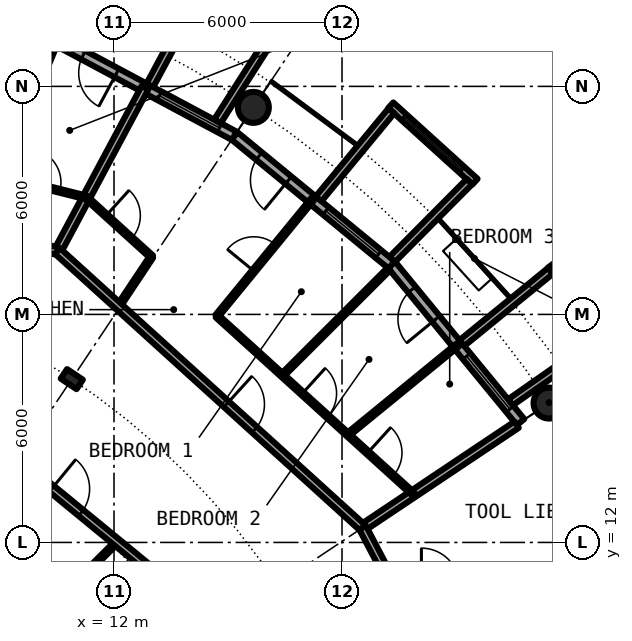
"""IFC4 building model, lengths in metres.
Left out: names, types, materials, properties, quantities, classifications, styles, units other than length and angle.
Written with IfcOpenShell. Run it as: python <this file> out.ifc"""

import sys

from ifc_helpers import new_model, si_unit, direction, frame, frame_2d, origin, origin_2d, place, context, subcontext, project, spatial, rectangle, circle, hollow_circle, i_section, extrude, element, fill, save


model = new_model("IFC4")
c1 = context("Model", 3, precision=1e-05, world=origin(), true_north=direction((0.0, 1.0)))
c2 = subcontext(c1, "Body", "Model", "MODEL_VIEW")
j1 = project(units=[si_unit("LENGTHUNIT", "METRE"), si_unit("PLANEANGLEUNIT", "RADIAN")], contexts=[c1])
p1 = place(None, origin())
s1 = spatial("IfcSite", under=j1, at=p1, CompositionType="ELEMENT")
p2 = place(p1, origin())
s2 = spatial("IfcBuilding", under=s1, at=p2, CompositionType="ELEMENT")
p3 = place(p2, frame((0.0, 0.0, 161.6)))
s3 = spatial("IfcBuildingStorey", under=s2, at=p3, CompositionType="ELEMENT", Elevation=161.6)
for number, where, z_axis, x_axis in (
    (1, (23.448, 15.667, 0.0), (0.0, 0.0, 1.0), (1.0, 0.0, 0.0)),
    (2, (15.667, 23.448, 0.0), (0.0, 0.0, 1.0), (1.0, 0.0, 0.0)),
):
    element("IfcColumn", number, at=place(p3, frame(where, z_axis=z_axis, x_axis=x_axis)), inside=s3, PredefinedType="COLUMN", context=c2, shape_type="SweptSolid", body=[
        extrude(hollow_circle(Radius=0.406, WallThickness=0.04, at=origin_2d()), origin(), (0.0, 0.0, 1.0), 3.05),
    ])
p4 = place(p3, frame((10.889, 16.297, 0.0), z_axis=(0.0, 0.0, 1.0), x_axis=(0.55557023302, 0.831469612303, 0.0)))
e3 = element("IfcColumn", 3, at=p4, inside=s3, PredefinedType="COLUMN", context=c2, shape_type="SweptSolid", body=[
    extrude(i_section(OverallWidth=0.3, OverallDepth=0.5, WebThickness=0.014, FlangeThickness=0.028, FilletRadius=0.027, at=origin_2d()), origin(), (0.0, 0.0, 1.0), 3.05),
])
p5 = place(p3, frame((22.699, 15.167, 0.0), z_axis=(0.0, 0.0, 1.0), x_axis=(-0.634382322723, 0.773019449054, 0.0)))
e4 = element("IfcWall", 4, at=p5, inside=s3, PredefinedType="SOLIDWALL", context=c2, shape_type="SweptSolid", body=[
    extrude(rectangle(XDim=5.352, YDim=0.25, at=frame_2d((2.676, 0.0))), origin(), (0.0, 0.0, 1.0), 2.7),
])
p6 = place(p5, frame((0.441, 0.0, 0.3)))
e5 = element("IfcOpeningElement", 5, at=p6, cuts=e4, PredefinedType="OPENING", context=c2, shape_type="SweptSolid", body=[
    extrude(rectangle(XDim=1.8, YDim=2.1, at=frame_2d((0.9, 1.05))), frame((0.0, 0.135, 0.0), z_axis=(0.0, -1.0, 0.0), x_axis=(1.0, 0.0, 0.0)), (0.0, 0.0, 1.0), 0.27),
])
p7 = place(p5, frame((3.51, 0.0, 0.0)))
e6 = element("IfcOpeningElement", 6, at=p7, cuts=e4, PredefinedType="OPENING", context=c2, shape_type="SweptSolid", body=[
    extrude(rectangle(XDim=1.0, YDim=2.2, at=frame_2d((0.5, 1.1))), frame((0.0, 0.135, 0.0), z_axis=(0.0, -1.0, 0.0), x_axis=(1.0, 0.0, 0.0)), (0.0, 0.0, 1.0), 0.27),
])
p8 = place(p3, frame((24.972, 17.337, -0.03), z_axis=(0.0, 0.0, 1.0), x_axis=(-0.602806268067, 0.797887588059, 0.0)))
e7 = element("IfcWall", 7, at=p8, inside=s3, PredefinedType="SOLIDWALL", context=c2, shape_type="SweptSolid", body=[
    extrude(rectangle(XDim=2.447, YDim=0.2, at=frame_2d((1.223, 0.0))), origin(), (0.0, 0.0, 1.0), 2.73),
])
p9 = place(p8, frame((0.183, 0.0, 0.33)))
e8 = element("IfcOpeningElement", 8, at=p9, cuts=e7, PredefinedType="OPENING", context=c2, shape_type="SweptSolid", body=[
    extrude(circle(Radius=1.04, at=frame_2d((1.04, 1.04))), frame((0.0, 0.11, 0.0), z_axis=(0.0, -1.0, 0.0), x_axis=(1.0, 0.0, 0.0)), (0.0, 0.0, 1.0), 0.22),
])
p10 = place(p3, frame((22.433, 15.688, -0.03), z_axis=(0.0, 0.0, 1.0), x_axis=(0.819373043115, 0.573260687834, 0.0)))
e9 = element("IfcWall", 9, at=p10, inside=s3, PredefinedType="SOLIDWALL", context=c2, shape_type="SweptSolid", body=[
    extrude(rectangle(XDim=2.925, YDim=0.2, at=frame_2d((1.463, 0.0))), origin(), (0.0, 0.0, 1.0), 2.73),
])
p11 = place(p3, frame((21.155, 17.246, -0.03), z_axis=(0.0, 0.0, 1.0), x_axis=(0.775179004516, 0.631741648902, 0.0)))
e10 = element("IfcWall", 10, at=p11, inside=s3, PredefinedType="SOLIDWALL", context=c2, shape_type="SweptSolid", body=[
    extrude(rectangle(XDim=3.006, YDim=0.2, at=frame_2d((1.503, 0.0))), origin(), (0.0, 0.0, 1.0), 2.73),
])
p12 = place(p3, frame((19.304, 19.304, 0.0), z_axis=(0.0, 0.0, 1.0), x_axis=(-0.773019449054, 0.634382322723, 0.0)))
e11 = element("IfcWall", 11, at=p12, inside=s3, PredefinedType="SOLIDWALL", context=c2, shape_type="SweptSolid", body=[
    extrude(rectangle(XDim=5.352, YDim=0.25, at=frame_2d((2.676, 0.0))), origin(), (0.0, 0.0, 1.0), 2.7),
])
p13 = place(p12, frame((0.441, 0.0, 0.3)))
e12 = element("IfcOpeningElement", 12, at=p13, cuts=e11, PredefinedType="OPENING", context=c2, shape_type="SweptSolid", body=[
    extrude(rectangle(XDim=1.8, YDim=2.1, at=frame_2d((0.9, 1.05))), frame((0.0, 0.135, 0.0), z_axis=(0.0, -1.0, 0.0), x_axis=(1.0, 0.0, 0.0)), (0.0, 0.0, 1.0), 0.27),
])
p14 = place(p12, frame((3.51, 0.0, 0.0)))
e13 = element("IfcOpeningElement", 13, at=p14, cuts=e11, PredefinedType="OPENING", context=c2, shape_type="SweptSolid", body=[
    extrude(rectangle(XDim=1.0, YDim=2.2, at=frame_2d((0.5, 1.1))), frame((0.0, 0.135, 0.0), z_axis=(0.0, -1.0, 0.0), x_axis=(1.0, 0.0, 0.0)), (0.0, 0.0, 1.0), 0.27),
])
p15 = place(p3, frame((21.5, 21.493, -0.03), z_axis=(0.0, 0.0, 1.0), x_axis=(-0.740998365753, 0.671506829416, 0.0)))
e14 = element("IfcWall", 14, at=p15, inside=s3, PredefinedType="SOLIDWALL", context=c2, shape_type="SweptSolid", body=[
    extrude(rectangle(XDim=2.993, YDim=0.2, at=frame_2d((1.497, 0.0))), origin(), (0.0, 0.0, 1.0), 2.73),
])
p16 = place(p15, frame((0.457, 0.0, 0.33)))
e15 = element("IfcOpeningElement", 15, at=p16, cuts=e14, PredefinedType="OPENING", context=c2, shape_type="SweptSolid", body=[
    extrude(circle(Radius=1.04, at=frame_2d((1.04, 1.04))), frame((0.0, 0.11, 0.0), z_axis=(0.0, -1.0, 0.0), x_axis=(1.0, 0.0, 0.0)), (0.0, 0.0, 1.0), 0.22),
])
p17 = place(p3, frame((19.323, 19.45, -0.03), z_axis=(0.0, 0.0, 1.0), x_axis=(0.704476739375, 0.709727076896, 0.0)))
e16 = element("IfcWall", 16, at=p17, inside=s3, PredefinedType="SOLIDWALL", context=c2, shape_type="SweptSolid", body=[
    extrude(rectangle(XDim=2.883, YDim=0.2, at=frame_2d((1.441, 0.0))), origin(), (0.0, 0.0, 1.0), 2.73),
])
p18 = place(p3, frame((17.384, 21.041, -0.03), z_axis=(0.0, 0.0, 1.0), x_axis=(0.63709551667, 0.770784861449, 0.0)))
e17 = element("IfcWall", 17, at=p18, inside=s3, PredefinedType="SOLIDWALL", context=c2, shape_type="SweptSolid", body=[
    extrude(rectangle(XDim=3.006, YDim=0.2, at=frame_2d((1.503, 0.0))), origin(), (0.0, 0.0, 1.0), 2.73),
])
p19 = place(p3, frame((15.167, 22.699, 0.0), z_axis=(0.0, 0.0, 1.0), x_axis=(-0.881915646801, 0.471407246368, 0.0)))
e18 = element("IfcWall", 18, at=p19, inside=s3, PredefinedType="SOLIDWALL", context=c2, shape_type="SweptSolid", body=[
    extrude(rectangle(XDim=5.352, YDim=0.25, at=frame_2d((2.676, 0.0))), origin(), (0.0, 0.0, 1.0), 2.7),
])
p20 = place(p19, frame((0.441, 0.0, 0.3)))
e19 = element("IfcOpeningElement", 19, at=p20, cuts=e18, PredefinedType="OPENING", context=c2, shape_type="SweptSolid", body=[
    extrude(rectangle(XDim=1.8, YDim=2.1, at=frame_2d((0.9, 1.05))), frame((0.0, 0.135, 0.0), z_axis=(0.0, -1.0, 0.0), x_axis=(1.0, 0.0, 0.0)), (0.0, 0.0, 1.0), 0.27),
])
p21 = place(p19, frame((3.51, 0.0, 0.0)))
e20 = element("IfcOpeningElement", 20, at=p21, cuts=e18, PredefinedType="OPENING", context=c2, shape_type="SweptSolid", body=[
    extrude(rectangle(XDim=1.0, YDim=2.2, at=frame_2d((0.5, 1.1))), frame((0.0, 0.135, 0.0), z_axis=(0.0, -1.0, 0.0), x_axis=(1.0, 0.0, 0.0)), (0.0, 0.0, 1.0), 0.27),
])
p22 = place(p3, frame((14.722, 23.079, -0.03), z_axis=(0.0, 0.0, 1.0), x_axis=(0.537572179146, 0.843217737129, 0.0)))
e21 = element("IfcWall", 21, at=p22, inside=s3, PredefinedType="SOLIDWALL", context=c2, shape_type="SweptSolid", body=[
    extrude(rectangle(XDim=2.924, YDim=0.2, at=frame_2d((1.462, 0.0))), origin(), (0.0, 0.0, 1.0), 2.73),
])
p23 = place(p3, frame((12.945, 24.029, -0.03), z_axis=(0.0, 0.0, 1.0), x_axis=(0.474424310775, 0.88029629861, 0.0)))
e22 = element("IfcWall", 22, at=p23, inside=s3, PredefinedType="SOLIDWALL", context=c2, shape_type="SweptSolid", body=[
    extrude(rectangle(XDim=3.006, YDim=0.2, at=frame_2d((1.503, 0.0))), origin(), (0.0, 0.0, 1.0), 2.73),
])
p24 = place(p3, frame((9.013, 21.642, 0.0), z_axis=(0.0, 0.0, 1.0), x_axis=(0.384420204655, 0.923158223845, 0.0)))
e23 = element("IfcWall", 23, at=p24, inside=s3, PredefinedType="PARTITIONING", context=c2, shape_type="SweptSolid", body=[
    extrude(rectangle(XDim=3.73, YDim=0.1, at=frame_2d((1.865, 0.0))), origin(), (0.0, 0.0, 1.0), 2.7),
])
p25 = place(p3, frame((9.148, 9.1, 0.0), z_axis=(0.0, 0.0, 1.0), x_axis=(0.708822693149, 0.705386695138, 0.0)))
e24 = element("IfcWall", 24, at=p25, inside=s3, PredefinedType="PARTITIONING", context=c2, shape_type="SweptSolid", body=[
    extrude(rectangle(XDim=4.121, YDim=0.1, at=frame_2d((2.061, 0.0))), origin(), (0.0, 0.0, 1.0), 2.7),
])
p26 = place(p25, frame((1.611, 0.0, 0.0)))
e25 = element("IfcOpeningElement", 25, at=p26, cuts=e24, PredefinedType="OPENING", context=c2, shape_type="SweptSolid", body=[
    extrude(rectangle(XDim=0.9, YDim=2.3, at=frame_2d((0.45, 1.15))), frame((0.0, 0.06, 0.0), z_axis=(0.0, -1.0, 0.0), x_axis=(1.0, 0.0, 0.0)), (0.0, 0.0, 1.0), 0.12),
])
p27 = place(p3, frame((10.516, 19.665, 0.0), z_axis=(0.0, 0.0, 1.0), x_axis=(0.471388689095, 0.881925565903, 0.0)))
e26 = element("IfcWall", 26, at=p27, inside=s3, PredefinedType="PARTITIONING", context=c2, shape_type="SweptSolid", body=[
    extrude(rectangle(XDim=4.875, YDim=0.2, at=frame_2d((2.438, 0.0))), origin(), (0.0, 0.0, 1.0), 2.7),
])
p28 = place(p3, frame((12.118, 18.211, 0.0), z_axis=(0.0, 0.0, 1.0), x_axis=(0.554125989098, 0.832432813028, 0.0)))
e27 = element("IfcWall", 27, at=p28, inside=s3, PredefinedType="PARTITIONING", context=c2, shape_type="SweptSolid", body=[
    extrude(rectangle(XDim=1.57, YDim=0.1, at=frame_2d((0.785, 0.0))), origin(), (0.0, 0.0, 1.0), 2.7),
])
p29 = place(p3, frame((14.709, 17.958, 0.0), z_axis=(0.0, 0.0, 1.0), x_axis=(0.633590098448, 0.773668913133, 0.0)))
e28 = element("IfcWall", 28, at=p29, inside=s3, PredefinedType="PARTITIONING", context=c2, shape_type="SweptSolid", body=[
    extrude(rectangle(XDim=3.962, YDim=0.1, at=frame_2d((1.981, 0.0))), origin(), (0.0, 0.0, 1.0), 2.7),
])
p30 = place(p29, frame((1.531, 0.0, 0.0)))
e29 = element("IfcOpeningElement", 29, at=p30, cuts=e28, PredefinedType="OPENING", context=c2, shape_type="SweptSolid", body=[
    extrude(rectangle(XDim=0.9, YDim=2.3, at=frame_2d((0.45, 1.15))), frame((0.0, 0.06, 0.0), z_axis=(0.0, -1.0, 0.0), x_axis=(1.0, 0.0, 0.0)), (0.0, 0.0, 1.0), 0.12),
])
p31 = place(p3, frame((16.43, 16.398, 0.0), z_axis=(0.0, 0.0, 1.0), x_axis=(0.707722727509, 0.706490297858, 0.0)))
e30 = element("IfcWall", 30, at=p31, inside=s3, PredefinedType="PARTITIONING", context=c2, shape_type="SweptSolid", body=[
    extrude(rectangle(XDim=3.962, YDim=0.1, at=frame_2d((1.981, 0.0))), origin(), (0.0, 0.0, 1.0), 2.7),
])
p32 = place(p3, frame((18.154, 14.834, 0.0), z_axis=(0.0, 0.0, 1.0), x_axis=(0.77429537896, 0.632824356454, 0.0)))
e31 = element("IfcWall", 31, at=p32, inside=s3, PredefinedType="PARTITIONING", context=c2, shape_type="SweptSolid", body=[
    extrude(rectangle(XDim=3.731, YDim=0.1, at=frame_2d((1.865, 0.0))), origin(), (0.0, 0.0, 1.0), 2.7),
])
p33 = place(p3, frame((18.542, 12.389, 0.0), z_axis=(0.0, 0.0, 1.0), x_axis=(0.831387096605, 0.55569370664, 0.0)))
e32 = element("IfcWall", 32, at=p33, inside=s3, PredefinedType="PARTITIONING", context=c2, shape_type="SweptSolid", body=[
    extrude(rectangle(XDim=4.875, YDim=0.2, at=frame_2d((2.438, 0.0))), origin(), (0.0, 0.0, 1.0), 2.7),
])
p34 = place(p3, frame((6.773, 16.353, 0.0), z_axis=(0.0, 0.0, 1.0), x_axis=(0.773034536097, -0.634363938131, 0.0)))
e33 = element("IfcWall", 33, at=p34, inside=s3, PredefinedType="PARTITIONING", context=c2, shape_type="SweptSolid", body=[
    extrude(rectangle(XDim=10.277, YDim=0.2, at=frame_2d((5.138, 0.0))), origin(), (0.0, 0.0, 1.0), 2.7),
])
p35 = place(p34, frame((4.638, 0.0, 0.0)))
e34 = element("IfcOpeningElement", 34, at=p35, cuts=e33, PredefinedType="OPENING", context=c2, shape_type="SweptSolid", body=[
    extrude(rectangle(XDim=1.0, YDim=2.3, at=frame_2d((0.5, 1.15))), frame((0.0, 0.11, 0.0), z_axis=(0.0, -1.0, 0.0), x_axis=(1.0, 0.0, 0.0)), (0.0, 0.0, 1.0), 0.22),
])
p36 = place(p3, frame((0.0, 22.3, 0.0), z_axis=(0.0, 0.0, 1.0), x_axis=(0.969975381822, -0.243203122222, 0.0)))
e35 = element("IfcWall", 35, at=p36, inside=s3, PredefinedType="PARTITIONING", context=c2, shape_type="SweptSolid", body=[
    extrude(rectangle(XDim=10.843, YDim=0.2, at=frame_2d((5.421, 0.0))), origin(), (0.0, 0.0, 1.0), 2.7),
])
p37 = place(p36, frame((6.002, 0.0, 0.0)))
e36 = element("IfcOpeningElement", 36, at=p37, cuts=e35, PredefinedType="OPENING", context=c2, shape_type="SweptSolid", body=[
    extrude(rectangle(XDim=1.0, YDim=2.3, at=frame_2d((0.5, 1.15))), frame((0.0, 0.11, 0.0), z_axis=(0.0, -1.0, 0.0), x_axis=(1.0, 0.0, 0.0)), (0.0, 0.0, 1.0), 0.22),
])
p38 = place(p3, frame((10.512, 19.667, 0.0), z_axis=(0.0, 0.0, 1.0), x_axis=(0.740849323054, -0.67167125927, 0.0)))
e37 = element("IfcWall", 37, at=p38, inside=s3, PredefinedType="PARTITIONING", context=c2, shape_type="SweptSolid", body=[
    extrude(rectangle(XDim=10.842, YDim=0.2, at=frame_2d((5.421, 0.0))), origin(), (0.0, 0.0, 1.0), 2.7),
])
p39 = place(p38, frame((6.003, 0.0, 0.0)))
e38 = element("IfcOpeningElement", 38, at=p39, cuts=e37, PredefinedType="OPENING", context=c2, shape_type="SweptSolid", body=[
    extrude(rectangle(XDim=1.0, YDim=2.3, at=frame_2d((0.5, 1.15))), frame((0.0, 0.11, 0.0), z_axis=(0.0, -1.0, 0.0), x_axis=(1.0, 0.0, 0.0)), (0.0, 0.0, 1.0), 0.22),
])
p40 = place(p3, frame((18.542, 12.389, 0.0), z_axis=(0.0, 0.0, 1.0), x_axis=(0.465605550524, -0.884992356646, 0.0)))
e39 = element("IfcWall", 39, at=p40, inside=s3, PredefinedType="PARTITIONING", context=c2, shape_type="SweptSolid", body=[
    extrude(rectangle(XDim=1.643, YDim=0.2, at=frame_2d((0.821, 0.0))), origin(), (0.0, 0.0, 1.0), 2.7),
])
p41 = place(p3, frame((4.507, 22.771, 0.0), z_axis=(0.0, 0.0, 1.0), x_axis=(0.970020829306, -0.243021790611, 0.0)))
e40 = element("IfcWall", 40, at=p41, inside=s3, PredefinedType="PARTITIONING", context=c2, shape_type="SweptSolid", body=[
    extrude(rectangle(XDim=6.971, YDim=0.1, at=frame_2d((3.485, 0.0))), origin(), (0.0, 0.0, 1.0), 2.7),
])
p42 = place(p41, frame((3.031, 0.0, 0.0)))
e41 = element("IfcOpeningElement", 41, at=p42, cuts=e40, PredefinedType="OPENING", context=c2, shape_type="SweptSolid", body=[
    extrude(rectangle(XDim=0.9, YDim=2.3, at=frame_2d((0.45, 1.15))), frame((0.0, 0.06, 0.0), z_axis=(0.0, -1.0, 0.0), x_axis=(1.0, 0.0, 0.0)), (0.0, 0.0, 1.0), 0.12),
])
p43 = place(p41, frame((5.358, 0.0, 0.0)))
e42 = element("IfcOpeningElement", 42, at=p43, cuts=e40, PredefinedType="OPENING", context=c2, shape_type="SweptSolid", body=[
    extrude(rectangle(XDim=0.9, YDim=2.3, at=frame_2d((0.45, 1.15))), frame((0.0, 0.06, 0.0), z_axis=(0.0, -1.0, 0.0), x_axis=(1.0, 0.0, 0.0)), (0.0, 0.0, 1.0), 0.12),
])
p44 = place(p3, frame((11.271, 21.074, 0.0), z_axis=(0.0, 0.0, 1.0), x_axis=(0.74087097024, -0.671647381783, 0.0)))
e43 = element("IfcWall", 43, at=p44, inside=s3, PredefinedType="PARTITIONING", context=c2, shape_type="SweptSolid", body=[
    extrude(rectangle(XDim=2.324, YDim=0.1, at=frame_2d((1.162, 0.0))), origin(), (0.0, 0.0, 1.0), 2.7),
])
p45 = place(p44, frame((0.705, 0.0, 0.0)))
e44 = element("IfcOpeningElement", 44, at=p45, cuts=e43, PredefinedType="OPENING", context=c2, shape_type="SweptSolid", body=[
    extrude(rectangle(XDim=0.9, YDim=2.3, at=frame_2d((0.45, 1.15))), frame((0.0, 0.06, 0.0), z_axis=(0.0, -1.0, 0.0), x_axis=(1.0, 0.0, 0.0)), (0.0, 0.0, 1.0), 0.12),
])
p46 = place(p3, frame((14.709, 17.958, 0.0), z_axis=(0.0, 0.0, 1.0), x_axis=(0.740923753351, -0.671589153962, 0.0)))
e45 = element("IfcWall", 45, at=p46, inside=s3, PredefinedType="PARTITIONING", context=c2, shape_type="SweptSolid", body=[
    extrude(rectangle(XDim=6.969, YDim=0.1, at=frame_2d((3.484, 0.0))), origin(), (0.0, 0.0, 1.0), 2.7),
])
p47 = place(p46, frame((3.034, 0.0, 0.0)))
e46 = element("IfcOpeningElement", 46, at=p47, cuts=e45, PredefinedType="OPENING", context=c2, shape_type="SweptSolid", body=[
    extrude(rectangle(XDim=0.9, YDim=2.3, at=frame_2d((0.45, 1.15))), frame((0.0, 0.06, 0.0), z_axis=(0.0, -1.0, 0.0), x_axis=(1.0, 0.0, 0.0)), (0.0, 0.0, 1.0), 0.12),
])
p48 = place(p46, frame((5.357, 0.0, 0.0)))
e47 = element("IfcOpeningElement", 47, at=p48, cuts=e45, PredefinedType="OPENING", context=c2, shape_type="SweptSolid", body=[
    extrude(rectangle(XDim=0.9, YDim=2.3, at=frame_2d((0.45, 1.15))), frame((0.0, 0.06, 0.0), z_axis=(0.0, -1.0, 0.0), x_axis=(1.0, 0.0, 0.0)), (0.0, 0.0, 1.0), 0.12),
])
p49 = place(p6, origin())
e48 = element("IfcWindow", 48, at=p49, inside=s3, PartitioningType="SINGLE_PANEL", PredefinedType="WINDOW", context=c2, shape_type="SweptSolid", body=[
    extrude(rectangle(XDim=1.8, YDim=2.1, at=frame_2d((0.9, 1.05))), frame((0.0, 0.03, 0.0), z_axis=(0.0, -1.0, 0.0), x_axis=(1.0, 0.0, 0.0)), (0.0, 0.0, 1.0), 0.06),
])
fill(e5, e48)
p50 = place(p7, origin())
e49 = element("IfcDoor", 49, at=p50, inside=s3, OperationType="SINGLE_SWING_LEFT", PredefinedType="DOOR", context=c2, shape_type="SweptSolid", body=[
    extrude(rectangle(XDim=1.0, YDim=2.2, at=frame_2d((0.5, 1.1))), frame((0.0, 0.025, 0.0), z_axis=(0.0, -1.0, 0.0), x_axis=(1.0, 0.0, 0.0)), (0.0, 0.0, 1.0), 0.05),
])
fill(e6, e49)
p51 = place(p13, origin())
e50 = element("IfcWindow", 50, at=p51, inside=s3, PartitioningType="SINGLE_PANEL", PredefinedType="WINDOW", context=c2, shape_type="SweptSolid", body=[
    extrude(rectangle(XDim=1.8, YDim=2.1, at=frame_2d((0.9, 1.05))), frame((0.0, 0.03, 0.0), z_axis=(0.0, -1.0, 0.0), x_axis=(1.0, 0.0, 0.0)), (0.0, 0.0, 1.0), 0.06),
])
fill(e12, e50)
p52 = place(p16, origin())
e51 = element("IfcWindow", 51, at=p52, inside=s3, PartitioningType="SINGLE_PANEL", PredefinedType="WINDOW", context=c2, shape_type="SweptSolid", body=[
    extrude(circle(Radius=1.04, at=frame_2d((1.04, 1.04))), frame((0.0, 0.03, 0.0), z_axis=(0.0, -1.0, 0.0), x_axis=(1.0, 0.0, 0.0)), (0.0, 0.0, 1.0), 0.06),
])
fill(e15, e51)
p53 = place(p14, origin())
e52 = element("IfcDoor", 52, at=p53, inside=s3, OperationType="SINGLE_SWING_LEFT", PredefinedType="DOOR", context=c2, shape_type="SweptSolid", body=[
    extrude(rectangle(XDim=1.0, YDim=2.2, at=frame_2d((0.5, 1.1))), frame((0.0, 0.025, 0.0), z_axis=(0.0, -1.0, 0.0), x_axis=(1.0, 0.0, 0.0)), (0.0, 0.0, 1.0), 0.05),
])
fill(e13, e52)
p54 = place(p20, origin())
e53 = element("IfcWindow", 53, at=p54, inside=s3, PartitioningType="SINGLE_PANEL", PredefinedType="WINDOW", context=c2, shape_type="SweptSolid", body=[
    extrude(rectangle(XDim=1.8, YDim=2.1, at=frame_2d((0.9, 1.05))), frame((0.0, 0.03, 0.0), z_axis=(0.0, -1.0, 0.0), x_axis=(1.0, 0.0, 0.0)), (0.0, 0.0, 1.0), 0.06),
])
fill(e19, e53)
p55 = place(p21, origin())
e54 = element("IfcDoor", 54, at=p55, inside=s3, OperationType="SINGLE_SWING_LEFT", PredefinedType="DOOR", context=c2, shape_type="SweptSolid", body=[
    extrude(rectangle(XDim=1.0, YDim=2.2, at=frame_2d((0.5, 1.1))), frame((0.0, 0.025, 0.0), z_axis=(0.0, -1.0, 0.0), x_axis=(1.0, 0.0, 0.0)), (0.0, 0.0, 1.0), 0.05),
])
fill(e20, e54)
p56 = place(p39, origin())
e55 = element("IfcDoor", 55, at=p56, inside=s3, OperationType="SINGLE_SWING_RIGHT", PredefinedType="DOOR", context=c2, shape_type="SweptSolid", body=[
    extrude(rectangle(XDim=1.0, YDim=2.3, at=frame_2d((0.5, 1.15))), frame((0.0, 0.025, 0.0), z_axis=(0.0, -1.0, 0.0), x_axis=(1.0, 0.0, 0.0)), (0.0, 0.0, 1.0), 0.05),
])
fill(e38, e55)
p57 = place(p45, origin())
e56 = element("IfcDoor", 56, at=p57, inside=s3, OperationType="SINGLE_SWING_LEFT", PredefinedType="DOOR", context=c2, shape_type="SweptSolid", body=[
    extrude(rectangle(XDim=0.9, YDim=2.3, at=frame_2d((0.45, 1.15))), frame((0.0, 0.025, 0.0), z_axis=(0.0, -1.0, 0.0), x_axis=(1.0, 0.0, 0.0)), (0.0, 0.0, 1.0), 0.05),
])
fill(e44, e56)
p58 = place(p30, origin())
e57 = element("IfcDoor", 57, at=p58, inside=s3, OperationType="SINGLE_SWING_RIGHT", PredefinedType="DOOR", context=c2, shape_type="SweptSolid", body=[
    extrude(rectangle(XDim=0.9, YDim=2.3, at=frame_2d((0.45, 1.15))), frame((0.0, 0.025, 0.0), z_axis=(0.0, -1.0, 0.0), x_axis=(1.0, 0.0, 0.0)), (0.0, 0.0, 1.0), 0.05),
])
fill(e29, e57)
p59 = place(p47, origin())
e58 = element("IfcDoor", 58, at=p59, inside=s3, OperationType="SINGLE_SWING_LEFT", PredefinedType="DOOR", context=c2, shape_type="SweptSolid", body=[
    extrude(rectangle(XDim=0.9, YDim=2.3, at=frame_2d((0.45, 1.15))), frame((0.0, 0.025, 0.0), z_axis=(0.0, -1.0, 0.0), x_axis=(1.0, 0.0, 0.0)), (0.0, 0.0, 1.0), 0.05),
])
fill(e46, e58)
p60 = place(p48, origin())
e59 = element("IfcDoor", 59, at=p60, inside=s3, OperationType="SINGLE_SWING_RIGHT", PredefinedType="DOOR", context=c2, shape_type="SweptSolid", body=[
    extrude(rectangle(XDim=0.9, YDim=2.3, at=frame_2d((0.45, 1.15))), frame((0.0, 0.025, 0.0), z_axis=(0.0, -1.0, 0.0), x_axis=(1.0, 0.0, 0.0)), (0.0, 0.0, 1.0), 0.05),
])
fill(e47, e59)
p61 = place(p43, origin())
e60 = element("IfcDoor", 60, at=p61, inside=s3, OperationType="SINGLE_SWING_RIGHT", PredefinedType="DOOR", context=c2, shape_type="SweptSolid", body=[
    extrude(rectangle(XDim=0.9, YDim=2.3, at=frame_2d((0.45, 1.15))), frame((0.0, 0.025, 0.0), z_axis=(0.0, -1.0, 0.0), x_axis=(1.0, 0.0, 0.0)), (0.0, 0.0, 1.0), 0.05),
])
fill(e42, e60)
p62 = place(p35, origin())
e61 = element("IfcDoor", 61, at=p62, inside=s3, OperationType="SINGLE_SWING_RIGHT", PredefinedType="DOOR", context=c2, shape_type="SweptSolid", body=[
    extrude(rectangle(XDim=1.0, YDim=2.3, at=frame_2d((0.5, 1.15))), frame((0.0, 0.025, 0.0), z_axis=(0.0, -1.0, 0.0), x_axis=(1.0, 0.0, 0.0)), (0.0, 0.0, 1.0), 0.05),
])
fill(e34, e61)
save(model, sys.argv[1])
